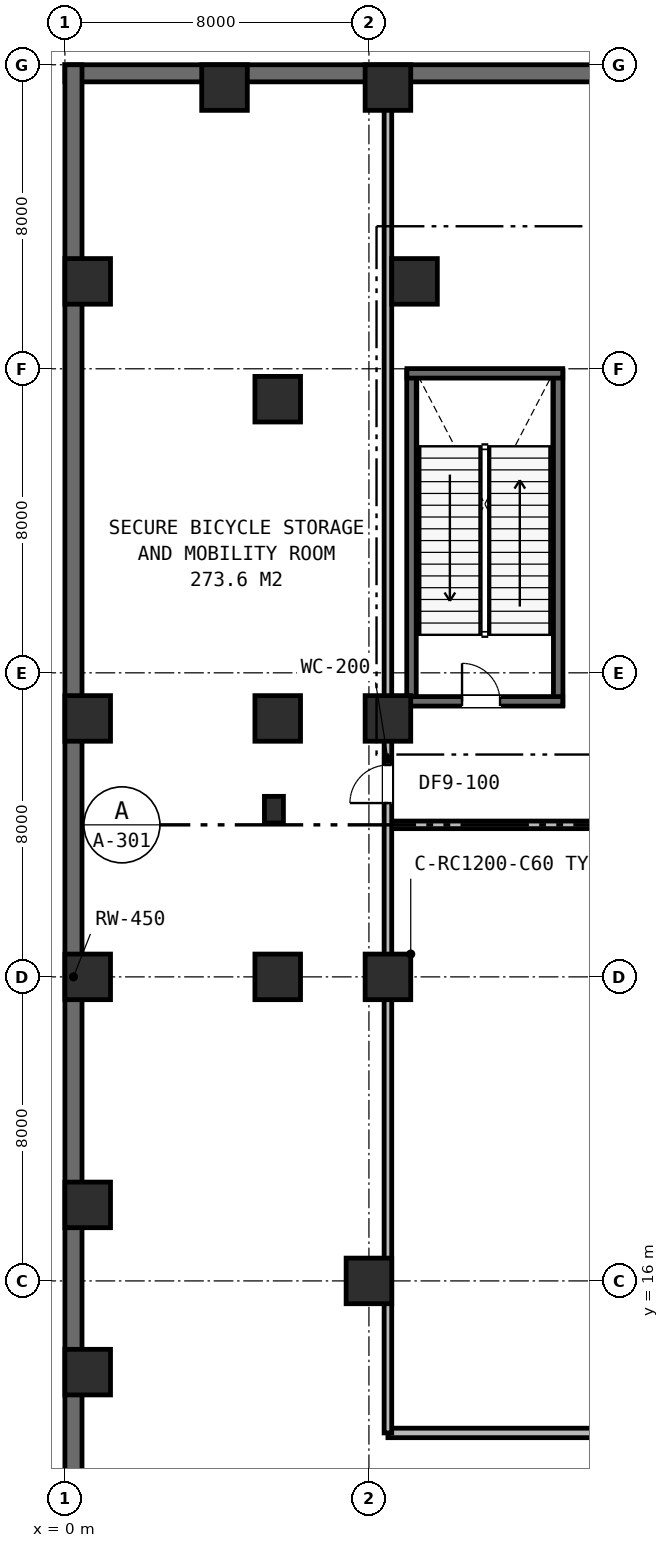
"""IFC4 building model, lengths in metres.
Left out: names, types, materials, properties, quantities, classifications, styles, units other than length and angle.
Written with IfcOpenShell. Run it as: python <this file> out.ifc"""

import sys

from ifc_helpers import new_model, si_unit, direction, frame, frame_2d, origin, origin_2d, place, context, subcontext, project, spatial, rectangle, extrude, element, fill, save


model = new_model("IFC4")
c1 = context("Model", 3, precision=1e-05, world=origin(), true_north=direction((0.0, 1.0)))
c2 = subcontext(c1, "Body", "Model", "MODEL_VIEW")
j1 = project(units=[si_unit("LENGTHUNIT", "METRE"), si_unit("PLANEANGLEUNIT", "RADIAN")], contexts=[c1])
p1 = place(None, origin())
s1 = spatial("IfcSite", under=j1, at=p1, CompositionType="ELEMENT")
p2 = place(p1, origin())
s2 = spatial("IfcBuilding", under=s1, at=p2, CompositionType="ELEMENT")
p3 = place(p2, frame((0.0, 0.0, -5.6)))
s3 = spatial("IfcBuildingStorey", under=s2, at=p3, CompositionType="ELEMENT", Elevation=-5.6)
p4 = place(p3, frame((0.0, 47.775, 0.0), z_axis=(0.0, 0.0, 1.0), x_axis=(1.0, 0.0, 0.0)))
e1 = element("IfcWall", 1, at=p4, inside=s3, PredefinedType="USERDEFINED", context=c2, shape_type="SweptSolid", body=[
    extrude(rectangle(XDim=56.0, YDim=0.45, at=frame_2d((28.0, 0.0))), origin(), (0.0, 0.0, 1.0), 5.6),
])
p5 = place(p3, frame((0.225, 0.0, 0.0), z_axis=(0.0, 0.0, 1.0), x_axis=(0.0, 1.0, 0.0)))
e2 = element("IfcWall", 2, at=p5, inside=s3, PredefinedType="USERDEFINED", context=c2, shape_type="SweptSolid", body=[
    extrude(rectangle(XDim=48.0, YDim=0.45, at=frame_2d((24.0, 0.0))), origin(), (0.0, 0.0, 1.0), 5.6),
])
for number, where, z_axis, x_axis in (
    (3, (9.12, 31.15, 0.0), (0.0, 0.0, 1.0), (0.0, 1.0, 0.0)),
    (4, (12.98, 31.15, 0.0), (0.0, 0.0, 1.0), (0.0, 1.0, 0.0)),
):
    element("IfcWall", number, at=place(p3, frame(where, z_axis=z_axis, x_axis=x_axis)), inside=s3, PredefinedType="SHEAR", context=c2, shape_type="SweptSolid", body=[
        extrude(rectangle(XDim=8.8, YDim=0.25, at=frame_2d((4.4, 0.0))), origin(), (0.0, 0.0, 1.0), 5.6),
    ])
p6 = place(p3, frame((9.0, 39.88, 0.0), z_axis=(0.0, 0.0, 1.0), x_axis=(1.0, 0.0, 0.0)))
e5 = element("IfcWall", 5, at=p6, inside=s3, PredefinedType="SHEAR", context=c2, shape_type="SweptSolid", body=[
    extrude(rectangle(XDim=4.1, YDim=0.25, at=frame_2d((2.05, 0.0))), origin(), (0.0, 0.0, 1.0), 5.6),
])
p7 = place(p3, frame((9.0, 31.25, 0.0), z_axis=(0.0, 0.0, 1.0), x_axis=(1.0, 0.0, 0.0)))
e6 = element("IfcWall", 6, at=p7, inside=s3, PredefinedType="SHEAR", context=c2, shape_type="SweptSolid", body=[
    extrude(rectangle(XDim=4.1, YDim=0.25, at=frame_2d((2.05, 0.0))), origin(), (0.0, 0.0, 1.0), 5.6),
])
p8 = place(p7, frame((1.45, 0.0, 0.0)))
e7 = element("IfcOpeningElement", 7, at=p8, cuts=e6, PredefinedType="OPENING", context=c2, shape_type="SweptSolid", body=[
    extrude(rectangle(XDim=1.0, YDim=2.15, at=frame_2d((0.5, 1.075))), frame((0.0, 0.135, 0.0), z_axis=(0.0, -1.0, 0.0), x_axis=(1.0, 0.0, 0.0)), (0.0, 0.0, 1.0), 0.27),
])
for number, where, z_axis, x_axis in (
    (8, (8.5, 24.0, 0.0), (0.0, 0.0, 1.0), (1.0, 0.0, 0.0)),
    (9, (5.6, 24.0, 0.0), (0.0, 0.0, 1.0), (1.0, 0.0, 0.0)),
    (10, (5.6, 30.8, 0.0), (0.0, 0.0, 1.0), (1.0, 0.0, 0.0)),
    (11, (5.6, 39.2, 0.0), (0.0, 0.0, 1.0), (1.0, 0.0, 0.0)),
    (12, (8.5, 30.8, 0.0), (0.0, 0.0, 1.0), (1.0, 0.0, 0.0)),
    (13, (9.2, 42.3, 0.0), (0.0, 0.0, 1.0), (1.0, 0.0, 0.0)),
    (14, (0.6, 24.0, 0.0), (0.0, 0.0, 1.0), (1.0, 0.0, 0.0)),
    (15, (0.6, 30.8, 0.0), (0.0, 0.0, 1.0), (1.0, 0.0, 0.0)),
    (16, (0.6, 42.3, 0.0), (0.0, 0.0, 1.0), (1.0, 0.0, 0.0)),
    (17, (4.2, 47.4, 0.0), (0.0, 0.0, 1.0), (1.0, 0.0, 0.0)),
    (18, (8.5, 47.4, 0.0), (0.0, 0.0, 1.0), (1.0, 0.0, 0.0)),
    (19, (0.6, 13.6, 0.0), (0.0, 0.0, 1.0), (1.0, 0.0, 0.0)),
    (20, (0.6, 18.0, 0.0), (0.0, 0.0, 1.0), (1.0, 0.0, 0.0)),
    (21, (8.0, 16.0, 0.0), (0.0, 0.0, 1.0), (1.0, 0.0, 0.0)),
):
    element("IfcColumn", number, at=place(p3, frame(where, z_axis=z_axis, x_axis=x_axis)), inside=s3, PredefinedType="COLUMN", context=c2, shape_type="SweptSolid", body=[
        extrude(rectangle(XDim=1.2, YDim=1.2, at=origin_2d()), origin(), (0.0, 0.0, 1.0), 5.6),
    ])
p9 = place(p3, frame((8.5, 12.0, 0.0), z_axis=(0.0, 0.0, 1.0), x_axis=(1.0, 0.0, 0.0)))
e22 = element("IfcWall", 22, at=p9, inside=s3, PredefinedType="STANDARD", context=c2, shape_type="SweptSolid", body=[
    extrude(rectangle(XDim=32.3, YDim=0.25, at=frame_2d((16.15, 0.0))), origin(), (0.0, 0.0, 1.0), 5.27),
])
p10 = place(p9, frame((9.5, 0.0, 0.0)))
e23 = element("IfcOpeningElement", 23, at=p10, cuts=e22, PredefinedType="OPENING", context=c2, shape_type="SweptSolid", body=[
    extrude(rectangle(XDim=4.2, YDim=2.95, at=frame_2d((2.1, 1.475))), frame((0.0, 0.135, 0.0), z_axis=(0.0, -1.0, 0.0), x_axis=(1.0, 0.0, 0.0)), (0.0, 0.0, 1.0), 0.27),
])
p11 = place(p9, frame((17.5, 0.0, 0.0)))
e24 = element("IfcOpeningElement", 24, at=p11, cuts=e22, PredefinedType="OPENING", context=c2, shape_type="SweptSolid", body=[
    extrude(rectangle(XDim=4.2, YDim=2.95, at=frame_2d((2.1, 1.475))), frame((0.0, 0.135, 0.0), z_axis=(0.0, -1.0, 0.0), x_axis=(1.0, 0.0, 0.0)), (0.0, 0.0, 1.0), 0.27),
])
p12 = place(p3, frame((8.5, 28.0, 0.0), z_axis=(0.0, 0.0, 1.0), x_axis=(1.0, 0.0, 0.0)))
e25 = element("IfcWall", 25, at=p12, inside=s3, PredefinedType="PARTITIONING", context=c2, shape_type="SweptSolid", body=[
    extrude(rectangle(XDim=32.3, YDim=0.2, at=frame_2d((16.15, 0.0))), origin(), (0.0, 0.0, 1.0), 4.66),
])
p13 = place(p12, frame((16.0, 0.0, 0.0)))
e26 = element("IfcOpeningElement", 26, at=p13, cuts=e25, PredefinedType="OPENING", context=c2, shape_type="SweptSolid", body=[
    extrude(rectangle(XDim=1.1, YDim=2.15, at=frame_2d((0.55, 1.075))), frame((0.0, 0.11, 0.0), z_axis=(0.0, -1.0, 0.0), x_axis=(1.0, 0.0, 0.0)), (0.0, 0.0, 1.0), 0.22),
])
p14 = place(p3, frame((8.5, 12.0, 0.0), z_axis=(0.0, 0.0, 1.0), x_axis=(0.0, 1.0, 0.0)))
e27 = element("IfcWall", 27, at=p14, inside=s3, PredefinedType="PARTITIONING", context=c2, shape_type="SweptSolid", body=[
    extrude(rectangle(XDim=35.45, YDim=0.2, at=frame_2d((17.725, 0.0))), origin(), (0.0, 0.0, 1.0), 4.66),
])
p15 = place(p14, frame((16.574, 0.0, 0.0)))
e28 = element("IfcOpeningElement", 28, at=p15, cuts=e27, PredefinedType="OPENING", context=c2, shape_type="SweptSolid", body=[
    extrude(rectangle(XDim=1.0, YDim=2.15, at=frame_2d((0.5, 1.075))), frame((0.0, 0.11, 0.0), z_axis=(0.0, -1.0, 0.0), x_axis=(1.0, 0.0, 0.0)), (0.0, 0.0, 1.0), 0.22),
])
p16 = place(p3, frame((5.5, 28.4, 0.0), z_axis=(0.0, 0.0, 1.0), x_axis=(1.0, 0.0, 0.0)))
e29 = element("IfcColumn", 29, at=p16, inside=s3, PredefinedType="PILASTER", context=c2, shape_type="SweptSolid", body=[
    extrude(rectangle(XDim=0.5, YDim=0.7, at=origin_2d()), origin(), (0.0, 0.0, 1.0), 5.28),
])
p17 = place(p8, origin())
e30 = element("IfcDoor", 30, at=p17, inside=s3, OperationType="SINGLE_SWING_LEFT", PredefinedType="DOOR", context=c2, shape_type="SweptSolid", body=[
    extrude(rectangle(XDim=1.0, YDim=2.15, at=frame_2d((0.5, 1.075))), frame((0.0, 0.025, 0.0), z_axis=(0.0, -1.0, 0.0), x_axis=(1.0, 0.0, 0.0)), (0.0, 0.0, 1.0), 0.05),
])
fill(e7, e30)
p18 = place(p15, origin())
e31 = element("IfcDoor", 31, at=p18, inside=s3, OperationType="SINGLE_SWING_LEFT", PredefinedType="DOOR", context=c2, shape_type="SweptSolid", body=[
    extrude(rectangle(XDim=1.0, YDim=2.15, at=frame_2d((0.5, 1.075))), frame((0.0, 0.025, 0.0), z_axis=(0.0, -1.0, 0.0), x_axis=(1.0, 0.0, 0.0)), (0.0, 0.0, 1.0), 0.05),
])
fill(e28, e31)
save(model, sys.argv[1])
